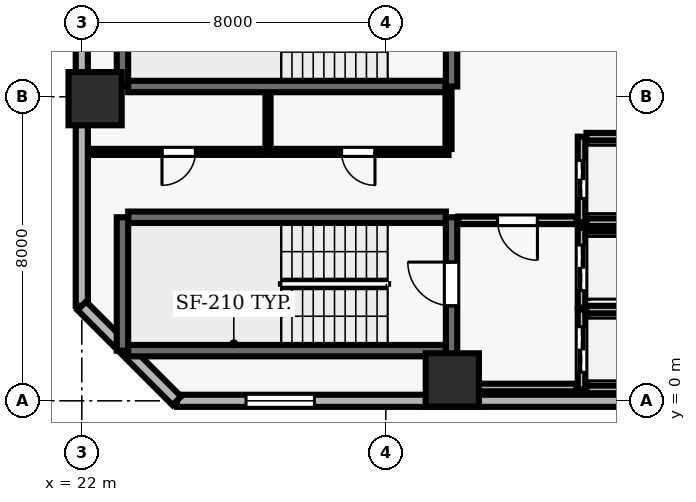
"""IFC4 building model, lengths in metres.
Left out: names, types, materials, properties, quantities, classifications, styles, units other than length and angle.
Written with IfcOpenShell. Run it as: python <this file> out.ifc"""

import sys

from ifc_helpers import new_model, si_unit, direction, frame, frame_2d, origin, origin_2d, place, context, subcontext, project, spatial, rectangle, extrude, element, fill, save


model = new_model("IFC4")
c1 = context("Model", 3, precision=1e-05, world=origin(), true_north=direction((0.0, 1.0)))
c2 = subcontext(c1, "Body", "Model", "MODEL_VIEW")
j1 = project(units=[si_unit("LENGTHUNIT", "METRE"), si_unit("PLANEANGLEUNIT", "RADIAN")], contexts=[c1])
p1 = place(None, origin())
s1 = spatial("IfcSite", under=j1, at=p1, CompositionType="ELEMENT")
p2 = place(p1, origin())
s2 = spatial("IfcBuilding", under=s1, at=p2, CompositionType="ELEMENT")
p3 = place(p2, frame((0.0, 0.0, 42.7)))
s3 = spatial("IfcBuildingStorey", under=s2, at=p3, CompositionType="ELEMENT", Elevation=42.7)
for number, where, z_axis, x_axis in (
    (1, (31.75, 0.55, 0.0), (0.0, 0.0, 1.0), (1.0, 0.0, 0.0)),
    (2, (22.35, 7.95, 0.0), (0.0, 0.0, 1.0), (1.0, 0.0, 0.0)),
):
    element("IfcColumn", number, at=place(p3, frame(where, z_axis=z_axis, x_axis=x_axis)), inside=s3, PredefinedType="COLUMN", context=c2, shape_type="SweptSolid", body=[
        extrude(rectangle(XDim=1.4, YDim=1.4, at=origin_2d()), origin(), (0.0, 0.0, 1.0), 3.9),
    ])
p4 = place(p3, frame((24.5, 0.0, 0.0), z_axis=(0.0, 0.0, 1.0), x_axis=(1.0, 0.0, 0.0)))
e3 = element("IfcWall", 3, at=p4, inside=s3, PredefinedType="SOLIDWALL", context=c2, shape_type="SweptSolid", body=[
    extrude(rectangle(XDim=49.0, YDim=0.32, at=frame_2d((24.5, 0.0))), origin(), (0.0, 0.0, 1.0), 3.69),
])
p5 = place(p4, frame((1.822, 0.0, 0.9)))
e4 = element("IfcOpeningElement", 4, at=p5, cuts=e3, PredefinedType="OPENING", context=c2, shape_type="SweptSolid", body=[
    extrude(rectangle(XDim=1.8, YDim=2.2, at=frame_2d((0.9, 1.1))), frame((0.0, 0.17, 0.0), z_axis=(0.0, -1.0, 0.0), x_axis=(1.0, 0.0, 0.0)), (0.0, 0.0, 1.0), 0.34),
])
p6 = place(p4, frame((18.156, 0.0, 0.9)))
e5 = element("IfcOpeningElement", 5, at=p6, cuts=e3, PredefinedType="OPENING", context=c2, shape_type="SweptSolid", body=[
    extrude(rectangle(XDim=1.8, YDim=2.2, at=frame_2d((0.9, 1.1))), frame((0.0, 0.17, 0.0), z_axis=(0.0, -1.0, 0.0), x_axis=(1.0, 0.0, 0.0)), (0.0, 0.0, 1.0), 0.34),
])
p7 = place(p4, frame((23.6, 0.0, 0.9)))
e6 = element("IfcOpeningElement", 6, at=p7, cuts=e3, PredefinedType="OPENING", context=c2, shape_type="SweptSolid", body=[
    extrude(rectangle(XDim=1.8, YDim=2.2, at=frame_2d((0.9, 1.1))), frame((0.0, 0.17, 0.0), z_axis=(0.0, -1.0, 0.0), x_axis=(1.0, 0.0, 0.0)), (0.0, 0.0, 1.0), 0.34),
])
p8 = place(p4, frame((29.044, 0.0, 0.9)))
e7 = element("IfcOpeningElement", 7, at=p8, cuts=e3, PredefinedType="OPENING", context=c2, shape_type="SweptSolid", body=[
    extrude(rectangle(XDim=1.8, YDim=2.2, at=frame_2d((0.9, 1.1))), frame((0.0, 0.17, 0.0), z_axis=(0.0, -1.0, 0.0), x_axis=(1.0, 0.0, 0.0)), (0.0, 0.0, 1.0), 0.34),
])
p9 = place(p4, frame((34.489, 0.0, 0.9)))
e8 = element("IfcOpeningElement", 8, at=p9, cuts=e3, PredefinedType="OPENING", context=c2, shape_type="SweptSolid", body=[
    extrude(rectangle(XDim=1.8, YDim=2.2, at=frame_2d((0.9, 1.1))), frame((0.0, 0.17, 0.0), z_axis=(0.0, -1.0, 0.0), x_axis=(1.0, 0.0, 0.0)), (0.0, 0.0, 1.0), 0.34),
])
p10 = place(p4, frame((39.933, 0.0, 0.9)))
e9 = element("IfcOpeningElement", 9, at=p10, cuts=e3, PredefinedType="OPENING", context=c2, shape_type="SweptSolid", body=[
    extrude(rectangle(XDim=1.8, YDim=2.2, at=frame_2d((0.9, 1.1))), frame((0.0, 0.17, 0.0), z_axis=(0.0, -1.0, 0.0), x_axis=(1.0, 0.0, 0.0)), (0.0, 0.0, 1.0), 0.34),
])
p11 = place(p4, frame((45.378, 0.0, 0.9)))
e10 = element("IfcOpeningElement", 10, at=p11, cuts=e3, PredefinedType="OPENING", context=c2, shape_type="SweptSolid", body=[
    extrude(rectangle(XDim=1.8, YDim=2.2, at=frame_2d((0.9, 1.1))), frame((0.0, 0.17, 0.0), z_axis=(0.0, -1.0, 0.0), x_axis=(1.0, 0.0, 0.0)), (0.0, 0.0, 1.0), 0.34),
])
p12 = place(p3, frame((22.0, 51.5, 0.0), z_axis=(0.0, 0.0, 1.0), x_axis=(0.0, -1.0, 0.0)))
e11 = element("IfcWall", 11, at=p12, inside=s3, PredefinedType="SOLIDWALL", context=c2, shape_type="SweptSolid", body=[
    extrude(rectangle(XDim=49.0, YDim=0.32, at=frame_2d((24.5, 0.0))), origin(), (0.0, 0.0, 1.0), 3.69),
])
p13 = place(p12, frame((12.1, 0.0, 0.0)))
e12 = element("IfcOpeningElement", 12, at=p13, cuts=e11, PredefinedType="OPENING", context=c2, shape_type="SweptSolid", body=[
    extrude(rectangle(XDim=1.0, YDim=2.2, at=frame_2d((0.5, 1.1))), frame((0.0, 0.17, 0.0), z_axis=(0.0, -1.0, 0.0), x_axis=(1.0, 0.0, 0.0)), (0.0, 0.0, 1.0), 0.34),
])
p14 = place(p12, frame((1.822, 0.0, 0.9)))
e13 = element("IfcOpeningElement", 13, at=p14, cuts=e11, PredefinedType="OPENING", context=c2, shape_type="SweptSolid", body=[
    extrude(rectangle(XDim=1.8, YDim=2.2, at=frame_2d((0.9, 1.1))), frame((0.0, 0.17, 0.0), z_axis=(0.0, -1.0, 0.0), x_axis=(1.0, 0.0, 0.0)), (0.0, 0.0, 1.0), 0.34),
])
p15 = place(p12, frame((7.267, 0.0, 0.9)))
e14 = element("IfcOpeningElement", 14, at=p15, cuts=e11, PredefinedType="OPENING", context=c2, shape_type="SweptSolid", body=[
    extrude(rectangle(XDim=1.8, YDim=2.2, at=frame_2d((0.9, 1.1))), frame((0.0, 0.17, 0.0), z_axis=(0.0, -1.0, 0.0), x_axis=(1.0, 0.0, 0.0)), (0.0, 0.0, 1.0), 0.34),
])
p16 = place(p12, frame((19.056, 0.0, 0.9)))
e15 = element("IfcOpeningElement", 15, at=p16, cuts=e11, PredefinedType="OPENING", context=c2, shape_type="SweptSolid", body=[
    extrude(rectangle(XDim=1.8, YDim=2.2, at=frame_2d((0.9, 1.1))), frame((0.0, 0.17, 0.0), z_axis=(0.0, -1.0, 0.0), x_axis=(1.0, 0.0, 0.0)), (0.0, 0.0, 1.0), 0.34),
])
p17 = place(p12, frame((23.15, 0.0, 0.9)))
e16 = element("IfcOpeningElement", 16, at=p17, cuts=e11, PredefinedType="OPENING", context=c2, shape_type="SweptSolid", body=[
    extrude(rectangle(XDim=1.8, YDim=2.2, at=frame_2d((0.9, 1.1))), frame((0.0, 0.17, 0.0), z_axis=(0.0, -1.0, 0.0), x_axis=(1.0, 0.0, 0.0)), (0.0, 0.0, 1.0), 0.34),
])
p18 = place(p12, frame((29.044, 0.0, 0.9)))
e17 = element("IfcOpeningElement", 17, at=p18, cuts=e11, PredefinedType="OPENING", context=c2, shape_type="SweptSolid", body=[
    extrude(rectangle(XDim=1.8, YDim=2.2, at=frame_2d((0.9, 1.1))), frame((0.0, 0.17, 0.0), z_axis=(0.0, -1.0, 0.0), x_axis=(1.0, 0.0, 0.0)), (0.0, 0.0, 1.0), 0.34),
])
p19 = place(p12, frame((34.039, 0.0, 0.9)))
e18 = element("IfcOpeningElement", 18, at=p19, cuts=e11, PredefinedType="OPENING", context=c2, shape_type="SweptSolid", body=[
    extrude(rectangle(XDim=1.8, YDim=2.2, at=frame_2d((0.9, 1.1))), frame((0.0, 0.17, 0.0), z_axis=(0.0, -1.0, 0.0), x_axis=(1.0, 0.0, 0.0)), (0.0, 0.0, 1.0), 0.34),
])
p20 = place(p12, frame((39.933, 0.0, 0.9)))
e19 = element("IfcOpeningElement", 19, at=p20, cuts=e11, PredefinedType="OPENING", context=c2, shape_type="SweptSolid", body=[
    extrude(rectangle(XDim=1.8, YDim=2.2, at=frame_2d((0.9, 1.1))), frame((0.0, 0.17, 0.0), z_axis=(0.0, -1.0, 0.0), x_axis=(1.0, 0.0, 0.0)), (0.0, 0.0, 1.0), 0.34),
])
p21 = place(p3, frame((22.0, 2.5, 0.0), z_axis=(0.0, 0.0, 1.0), x_axis=(0.707106781187, -0.707106781187, 0.0)))
e20 = element("IfcWall", 20, at=p21, inside=s3, PredefinedType="SOLIDWALL", context=c2, shape_type="SweptSolid", body=[
    extrude(rectangle(XDim=3.536, YDim=0.32, at=frame_2d((1.768, 0.0))), origin(), (0.0, 0.0, 1.0), 3.69),
])
p22 = place(p3, frame((31.58, 4.83, 0.0), z_axis=(0.0, 0.0, 1.0), x_axis=(-1.0, 0.0, 0.0)))
e21 = element("IfcWall", 21, at=p22, inside=s3, PredefinedType="SHEAR", context=c2, shape_type="SweptSolid", body=[
    extrude(rectangle(XDim=8.36, YDim=0.3, at=frame_2d((4.18, 0.0))), origin(), (0.0, 0.0, 1.0), 3.69),
])
p23 = place(p3, frame((23.07, 4.83, 0.0), z_axis=(0.0, 0.0, 1.0), x_axis=(0.0, -1.0, 0.0)))
e22 = element("IfcWall", 22, at=p23, inside=s3, PredefinedType="SHEAR", context=c2, shape_type="SweptSolid", body=[
    extrude(rectangle(XDim=3.51, YDim=0.3, at=frame_2d((1.755, 0.0))), origin(), (0.0, 0.0, 1.0), 3.69),
])
p24 = place(p3, frame((23.22, 1.32, 0.0), z_axis=(0.0, 0.0, 1.0), x_axis=(1.0, 0.0, 0.0)))
e23 = element("IfcWall", 23, at=p24, inside=s3, PredefinedType="SHEAR", context=c2, shape_type="SweptSolid", body=[
    extrude(rectangle(XDim=8.36, YDim=0.3, at=frame_2d((4.18, 0.0))), origin(), (0.0, 0.0, 1.0), 3.69),
])
p25 = place(p3, frame((31.73, 0.96, 0.0), z_axis=(0.0, 0.0, 1.0), x_axis=(0.0, 1.0, 0.0)))
e24 = element("IfcWall", 24, at=p25, inside=s3, PredefinedType="SHEAR", context=c2, shape_type="SweptSolid", body=[
    extrude(rectangle(XDim=3.87, YDim=0.3, at=frame_2d((1.935, 0.0))), origin(), (0.0, 0.0, 1.0), 3.69),
])
p26 = place(p25, frame((1.54, 0.0, 0.0)))
e25 = element("IfcOpeningElement", 25, at=p26, cuts=e24, PredefinedType="OPENING", context=c2, shape_type="SweptSolid", body=[
    extrude(rectangle(XDim=1.15, YDim=2.15, at=frame_2d((0.575, 1.075))), frame((0.0, 0.16, 0.0), z_axis=(0.0, -1.0, 0.0), x_axis=(1.0, 0.0, 0.0)), (0.0, 0.0, 1.0), 0.32),
])
p27 = place(p3, frame((23.07, 11.78, 0.0), z_axis=(0.0, 0.0, 1.0), x_axis=(0.0, -1.0, 0.0)))
e26 = element("IfcWall", 26, at=p27, inside=s3, PredefinedType="SHEAR", context=c2, shape_type="SweptSolid", body=[
    extrude(rectangle(XDim=3.51, YDim=0.3, at=frame_2d((1.755, 0.0))), origin(), (0.0, 0.0, 1.0), 3.69),
])
p28 = place(p3, frame((23.22, 8.27, 0.0), z_axis=(0.0, 0.0, 1.0), x_axis=(1.0, 0.0, 0.0)))
e27 = element("IfcWall", 27, at=p28, inside=s3, PredefinedType="SHEAR", context=c2, shape_type="SweptSolid", body=[
    extrude(rectangle(XDim=8.36, YDim=0.3, at=frame_2d((4.18, 0.0))), origin(), (0.0, 0.0, 1.0), 3.69),
])
p29 = place(p3, frame((31.73, 8.27, 0.0), z_axis=(0.0, 0.0, 1.0), x_axis=(0.0, 1.0, 0.0)))
e28 = element("IfcWall", 28, at=p29, inside=s3, PredefinedType="SHEAR", context=c2, shape_type="SweptSolid", body=[
    extrude(rectangle(XDim=3.51, YDim=0.3, at=frame_2d((1.755, 0.0))), origin(), (0.0, 0.0, 1.0), 3.69),
])
p30 = place(p29, frame((1.18, 0.0, 0.0)))
e29 = element("IfcOpeningElement", 29, at=p30, cuts=e28, PredefinedType="OPENING", context=c2, shape_type="SweptSolid", body=[
    extrude(rectangle(XDim=1.15, YDim=2.15, at=frame_2d((0.575, 1.075))), frame((0.0, 0.16, 0.0), z_axis=(0.0, -1.0, 0.0), x_axis=(1.0, 0.0, 0.0)), (0.0, 0.0, 1.0), 0.32),
])
p31 = place(p3, frame((35.15, 2.4, 0.0), z_axis=(0.0, 0.0, 1.0), x_axis=(0.0, -1.0, 0.0)))
e30 = element("IfcWall", 30, at=p31, inside=s3, PredefinedType="SOLIDWALL", context=c2, shape_type="SweptSolid", body=[
    extrude(rectangle(XDim=2.1, YDim=0.2, at=frame_2d((1.05, 0.0))), origin(), (0.0, 0.0, 1.0), 3.69),
])
p32 = place(p31, frame((0.45, 0.0, 0.0)))
e31 = element("IfcOpeningElement", 31, at=p32, cuts=e30, PredefinedType="OPENING", context=c2, shape_type="SweptSolid", body=[
    extrude(rectangle(XDim=1.2, YDim=2.15, at=frame_2d((0.6, 1.075))), frame((0.0, 0.11, 0.0), z_axis=(0.0, -1.0, 0.0), x_axis=(1.0, 0.0, 0.0)), (0.0, 0.0, 1.0), 0.22),
])
for number, where, z_axis, x_axis in (
    (32, (35.28, 0.3, 0.0), (0.0, 0.0, 1.0), (1.0, 0.0, 0.0)),
    (33, (37.42, 2.4, 0.0), (0.0, 0.0, 1.0), (-1.0, 0.0, 0.0)),
):
    element("IfcWall", number, at=place(p3, frame(where, z_axis=z_axis, x_axis=x_axis)), inside=s3, PredefinedType="SOLIDWALL", context=c2, shape_type="SweptSolid", body=[
        extrude(rectangle(XDim=2.14, YDim=0.2, at=frame_2d((1.07, 0.0))), origin(), (0.0, 0.0, 1.0), 3.69),
    ])
p33 = place(p3, frame((35.15, 4.55, 0.0), z_axis=(0.0, 0.0, 1.0), x_axis=(0.0, -1.0, 0.0)))
e34 = element("IfcWall", 34, at=p33, inside=s3, PredefinedType="SOLIDWALL", context=c2, shape_type="SweptSolid", body=[
    extrude(rectangle(XDim=2.1, YDim=0.2, at=frame_2d((1.05, 0.0))), origin(), (0.0, 0.0, 1.0), 3.69),
])
p34 = place(p33, frame((0.45, 0.0, 0.0)))
e35 = element("IfcOpeningElement", 35, at=p34, cuts=e34, PredefinedType="OPENING", context=c2, shape_type="SweptSolid", body=[
    extrude(rectangle(XDim=1.2, YDim=2.15, at=frame_2d((0.6, 1.075))), frame((0.0, 0.11, 0.0), z_axis=(0.0, -1.0, 0.0), x_axis=(1.0, 0.0, 0.0)), (0.0, 0.0, 1.0), 0.22),
])
p35 = place(p3, frame((37.42, 4.55, 0.0), z_axis=(0.0, 0.0, 1.0), x_axis=(-1.0, 0.0, 0.0)))
e36 = element("IfcWall", 36, at=p35, inside=s3, PredefinedType="SOLIDWALL", context=c2, shape_type="SweptSolid", body=[
    extrude(rectangle(XDim=2.14, YDim=0.2, at=frame_2d((1.07, 0.0))), origin(), (0.0, 0.0, 1.0), 3.69),
])
p36 = place(p3, frame((35.15, 6.95, 0.0), z_axis=(0.0, 0.0, 1.0), x_axis=(0.0, -1.0, 0.0)))
e37 = element("IfcWall", 37, at=p36, inside=s3, PredefinedType="SOLIDWALL", context=c2, shape_type="SweptSolid", body=[
    extrude(rectangle(XDim=2.25, YDim=0.2, at=frame_2d((1.125, 0.0))), origin(), (0.0, 0.0, 1.0), 3.69),
])
p37 = place(p36, frame((0.625, 0.0, 0.0)))
e38 = element("IfcOpeningElement", 38, at=p37, cuts=e37, PredefinedType="OPENING", context=c2, shape_type="SweptSolid", body=[
    extrude(rectangle(XDim=1.0, YDim=2.1, at=frame_2d((0.5, 1.05))), frame((0.0, 0.11, 0.0), z_axis=(0.0, -1.0, 0.0), x_axis=(1.0, 0.0, 0.0)), (0.0, 0.0, 1.0), 0.22),
])
for number, where, z_axis, x_axis in (
    (39, (35.28, 4.7, 0.0), (0.0, 0.0, 1.0), (1.0, 0.0, 0.0)),
    (40, (37.42, 6.95, 0.0), (0.0, 0.0, 1.0), (-1.0, 0.0, 0.0)),
):
    element("IfcWall", number, at=place(p3, frame(where, z_axis=z_axis, x_axis=x_axis)), inside=s3, PredefinedType="SOLIDWALL", context=c2, shape_type="SweptSolid", body=[
        extrude(rectangle(XDim=2.14, YDim=0.2, at=frame_2d((1.07, 0.0))), origin(), (0.0, 0.0, 1.0), 3.69),
    ])
p38 = place(p3, frame((26.9, 6.55, 0.0), z_axis=(0.0, 0.0, 1.0), x_axis=(-1.0, 0.0, 0.0)))
e41 = element("IfcWall", 41, at=p38, inside=s3, PredefinedType="PARTITIONING", context=c2, shape_type="SweptSolid", body=[
    extrude(rectangle(XDim=4.7, YDim=0.16, at=frame_2d((2.35, 0.0))), origin(), (0.0, 0.0, 1.0), 3.69),
])
p39 = place(p38, frame((1.91, 0.0, 0.0)))
e42 = element("IfcOpeningElement", 42, at=p39, cuts=e41, PredefinedType="OPENING", context=c2, shape_type="SweptSolid", body=[
    extrude(rectangle(XDim=0.88, YDim=2.1, at=frame_2d((0.44, 1.05))), frame((0.0, 0.09, 0.0), z_axis=(0.0, -1.0, 0.0), x_axis=(1.0, 0.0, 0.0)), (0.0, 0.0, 1.0), 0.18),
])
p40 = place(p3, frame((31.65, 0.35, 0.0), z_axis=(0.0, 0.0, 1.0), x_axis=(1.0, 0.0, 0.0)))
e43 = element("IfcWall", 43, at=p40, inside=s3, PredefinedType="SOLIDWALL", context=c2, shape_type="SweptSolid", body=[
    extrude(rectangle(XDim=3.37, YDim=0.2, at=frame_2d((1.685, 0.0))), origin(), (0.0, 0.0, 1.0), 3.69),
])
p41 = place(p3, frame((31.65, 6.55, 0.0), z_axis=(0.0, 0.0, 1.0), x_axis=(-1.0, 0.0, 0.0)))
e44 = element("IfcWall", 44, at=p41, inside=s3, PredefinedType="PARTITIONING", context=c2, shape_type="SweptSolid", body=[
    extrude(rectangle(XDim=4.75, YDim=0.16, at=frame_2d((2.375, 0.0))), origin(), (0.0, 0.0, 1.0), 3.69),
])
p42 = place(p41, frame((1.935, 0.0, 0.0)))
e45 = element("IfcOpeningElement", 45, at=p42, cuts=e44, PredefinedType="OPENING", context=c2, shape_type="SweptSolid", body=[
    extrude(rectangle(XDim=0.88, YDim=2.1, at=frame_2d((0.44, 1.05))), frame((0.0, 0.09, 0.0), z_axis=(0.0, -1.0, 0.0), x_axis=(1.0, 0.0, 0.0)), (0.0, 0.0, 1.0), 0.18),
])
p43 = place(p3, frame((35.02, 4.75, 0.0), z_axis=(0.0, 0.0, 1.0), x_axis=(-1.0, 0.0, 0.0)))
e46 = element("IfcWall", 46, at=p43, inside=s3, PredefinedType="SOLIDWALL", context=c2, shape_type="SweptSolid", body=[
    extrude(rectangle(XDim=3.11, YDim=0.2, at=frame_2d((1.555, 0.0))), origin(), (0.0, 0.0, 1.0), 3.69),
])
p44 = place(p43, frame((1.03, 0.0, 0.0)))
e47 = element("IfcOpeningElement", 47, at=p44, cuts=e46, PredefinedType="OPENING", context=c2, shape_type="SweptSolid", body=[
    extrude(rectangle(XDim=1.05, YDim=2.15, at=frame_2d((0.525, 1.075))), frame((0.0, 0.11, 0.0), z_axis=(0.0, -1.0, 0.0), x_axis=(1.0, 0.0, 0.0)), (0.0, 0.0, 1.0), 0.22),
])
p45 = place(p3, frame((26.9, 6.625, 0.0), z_axis=(0.0, 0.0, 1.0), x_axis=(0.0, 1.0, 0.0)))
e48 = element("IfcWall", 48, at=p45, inside=s3, PredefinedType="PARTITIONING", context=c2, shape_type="SweptSolid", body=[
    extrude(rectangle(XDim=1.465, YDim=0.135, at=frame_2d((0.732, 0.0))), origin(), (0.0, 0.0, 1.0), 3.69),
])
p46 = place(p3, frame((31.65, 8.24, 0.0), z_axis=(0.0, 0.0, 1.0), x_axis=(0.0, -1.0, 0.0)))
e49 = element("IfcWall", 49, at=p46, inside=s3, PredefinedType="PARTITIONING", context=c2, shape_type="SweptSolid", body=[
    extrude(rectangle(XDim=1.615, YDim=0.16, at=frame_2d((0.808, 0.0))), origin(), (0.0, 0.0, 1.0), 3.69),
])
p47 = place(p5, origin())
e50 = element("IfcWindow", 50, at=p47, inside=s3, PartitioningType="SINGLE_PANEL", PredefinedType="WINDOW", context=c2, shape_type="SweptSolid", body=[
    extrude(rectangle(XDim=1.8, YDim=2.2, at=frame_2d((0.9, 1.1))), frame((0.0, 0.03, 0.0), z_axis=(0.0, -1.0, 0.0), x_axis=(1.0, 0.0, 0.0)), (0.0, 0.0, 1.0), 0.06),
])
fill(e4, e50)
p48 = place(p26, origin())
e51 = element("IfcDoor", 51, at=p48, inside=s3, OperationType="SINGLE_SWING_RIGHT", PredefinedType="DOOR", context=c2, shape_type="SweptSolid", body=[
    extrude(rectangle(XDim=1.15, YDim=2.15, at=frame_2d((0.575, 1.075))), frame((0.0, 0.025, 0.0), z_axis=(0.0, -1.0, 0.0), x_axis=(1.0, 0.0, 0.0)), (0.0, 0.0, 1.0), 0.05),
])
fill(e25, e51)
p49 = place(p32, origin())
e52 = element("IfcDoor", 52, at=p49, inside=s3, OperationType="DOUBLE_DOOR_SLIDING", PredefinedType="DOOR", context=c2, shape_type="SweptSolid", body=[
    extrude(rectangle(XDim=1.2, YDim=2.15, at=frame_2d((0.6, 1.075))), frame((0.0, 0.025, 0.0), z_axis=(0.0, -1.0, 0.0), x_axis=(1.0, 0.0, 0.0)), (0.0, 0.0, 1.0), 0.05),
])
fill(e31, e52)
p50 = place(p34, origin())
e53 = element("IfcDoor", 53, at=p50, inside=s3, OperationType="DOUBLE_DOOR_SLIDING", PredefinedType="DOOR", context=c2, shape_type="SweptSolid", body=[
    extrude(rectangle(XDim=1.2, YDim=2.15, at=frame_2d((0.6, 1.075))), frame((0.0, 0.025, 0.0), z_axis=(0.0, -1.0, 0.0), x_axis=(1.0, 0.0, 0.0)), (0.0, 0.0, 1.0), 0.05),
])
fill(e35, e53)
p51 = place(p37, origin())
e54 = element("IfcDoor", 54, at=p51, inside=s3, OperationType="DOUBLE_DOOR_SLIDING", PredefinedType="DOOR", context=c2, shape_type="SweptSolid", body=[
    extrude(rectangle(XDim=1.0, YDim=2.1, at=frame_2d((0.5, 1.05))), frame((0.0, 0.025, 0.0), z_axis=(0.0, -1.0, 0.0), x_axis=(1.0, 0.0, 0.0)), (0.0, 0.0, 1.0), 0.05),
])
fill(e38, e54)
p52 = place(p44, origin())
e55 = element("IfcDoor", 55, at=p52, inside=s3, OperationType="SINGLE_SWING_LEFT", PredefinedType="DOOR", context=c2, shape_type="SweptSolid", body=[
    extrude(rectangle(XDim=1.05, YDim=2.15, at=frame_2d((0.525, 1.075))), frame((0.0, 0.025, 0.0), z_axis=(0.0, -1.0, 0.0), x_axis=(1.0, 0.0, 0.0)), (0.0, 0.0, 1.0), 0.05),
])
fill(e47, e55)
p53 = place(p39, origin())
e56 = element("IfcDoor", 56, at=p53, inside=s3, OperationType="SINGLE_SWING_RIGHT", PredefinedType="DOOR", context=c2, shape_type="SweptSolid", body=[
    extrude(rectangle(XDim=0.88, YDim=2.1, at=frame_2d((0.44, 1.05))), frame((0.0, 0.025, 0.0), z_axis=(0.0, -1.0, 0.0), x_axis=(1.0, 0.0, 0.0)), (0.0, 0.0, 1.0), 0.05),
])
fill(e42, e56)
p54 = place(p42, origin())
e57 = element("IfcDoor", 57, at=p54, inside=s3, OperationType="SINGLE_SWING_LEFT", PredefinedType="DOOR", context=c2, shape_type="SweptSolid", body=[
    extrude(rectangle(XDim=0.88, YDim=2.1, at=frame_2d((0.44, 1.05))), frame((0.0, 0.025, 0.0), z_axis=(0.0, -1.0, 0.0), x_axis=(1.0, 0.0, 0.0)), (0.0, 0.0, 1.0), 0.05),
])
fill(e45, e57)
save(model, sys.argv[1])
